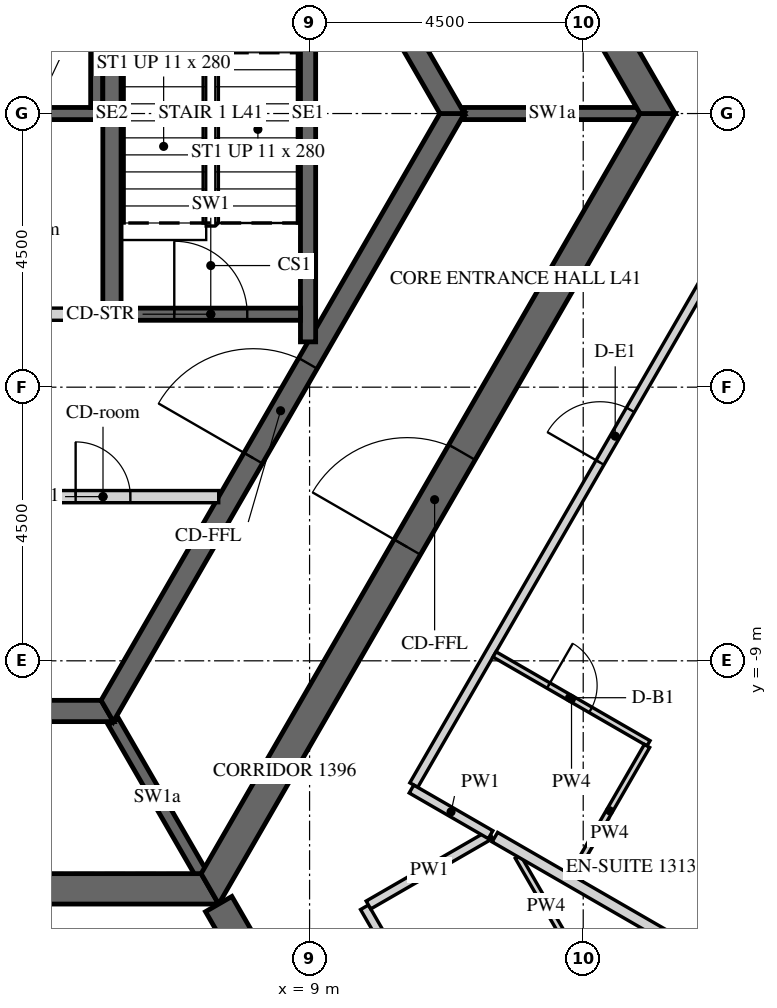
"""IFC4 building model, lengths in metres.
Left out: names, types, materials, properties, quantities, classifications, styles, units other than length and angle.
Written with IfcOpenShell. Run it as: python <this file> out.ifc"""

import sys

from ifc_helpers import new_model, si_unit, direction, frame, frame_2d, origin, place, context, subcontext, project, spatial, polyline, rectangle, outline, extrude, element, fill, save


model = new_model("IFC4")
c1 = context("Model", 3, precision=1e-05, world=origin(), true_north=direction((0.0, 1.0)))
c2 = subcontext(c1, "Body", "Model", "MODEL_VIEW")
j1 = project(units=[si_unit("LENGTHUNIT", "METRE"), si_unit("PLANEANGLEUNIT", "RADIAN")], contexts=[c1])
p1 = place(None, origin())
s1 = spatial("IfcSite", under=j1, at=p1, CompositionType="ELEMENT")
p2 = place(p1, origin())
s2 = spatial("IfcBuilding", under=s1, at=p2, CompositionType="ELEMENT")
p3 = place(p2, frame((0.0, 0.0, 176.1)))
s3 = spatial("IfcBuildingStorey", under=s2, at=p3, CompositionType="ELEMENT", Elevation=176.1)
p4 = place(p3, frame((-7.361, -12.75, -0.15), z_axis=(0.0, 0.0, 1.0), x_axis=(1.0, 0.0, 0.0)))
e1 = element("IfcWall", 1, at=p4, inside=s3, PredefinedType="SHEAR", context=c2, shape_type="SweptSolid", body=[
    extrude(outline(polyline([(-0.144, -0.25), (14.866, -0.25), (14.578, 0.25), (0.144, 0.25), (-0.144, -0.25)])), origin(), (0.0, 0.0, 1.0), 3.9),
])
p5 = place(p4, frame((6.761, 0.0, 0.15)))
e2 = element("IfcOpeningElement", 2, at=p5, cuts=e1, PredefinedType="OPENING", context=c2, shape_type="SweptSolid", body=[
    extrude(rectangle(XDim=1.2, YDim=2.4, at=frame_2d((0.6, 1.2))), frame((0.0, 0.26, 0.0), z_axis=(0.0, -1.0, 0.0), x_axis=(1.0, 0.0, 0.0)), (0.0, 0.0, 1.0), 0.52),
])
p6 = place(p3, frame((7.361, -12.75, -0.15), z_axis=(0.0, 0.0, 1.0), x_axis=(0.50000571537, 0.866022103989, 0.0)))
e3 = element("IfcWall", 3, at=p6, inside=s3, PredefinedType="SHEAR", context=c2, shape_type="SweptSolid", body=[
    extrude(outline(polyline([(-0.144, -0.25), (14.867, -0.25), (14.578, 0.25), (0.144, 0.25), (-0.144, -0.25)])), origin(), (0.0, 0.0, 1.0), 3.9),
])
p7 = place(p6, frame((6.49, 0.0, 0.15)))
e4 = element("IfcOpeningElement", 4, at=p7, cuts=e3, PredefinedType="OPENING", context=c2, shape_type="SweptSolid", body=[
    extrude(rectangle(XDim=1.8, YDim=2.4, at=frame_2d((0.9, 1.2))), frame((0.0, 0.26, 0.0), z_axis=(0.0, -1.0, 0.0), x_axis=(1.0, 0.0, 0.0)), (0.0, 0.0, 1.0), 0.52),
])
p8 = place(p3, frame((14.722, 0.0, -0.15), z_axis=(0.0, 0.0, 1.0), x_axis=(-0.50000571537, 0.866022103989, 0.0)))
e5 = element("IfcWall", 5, at=p8, inside=s3, PredefinedType="SHEAR", context=c2, shape_type="SweptSolid", body=[
    extrude(outline(polyline([(-0.144, -0.25), (14.867, -0.25), (14.578, 0.25), (0.144, 0.25), (-0.144, -0.25)])), origin(), (0.0, 0.0, 1.0), 3.9),
])
p9 = place(p8, frame((6.432, 0.0, 0.15)))
e6 = element("IfcOpeningElement", 6, at=p9, cuts=e5, PredefinedType="OPENING", context=c2, shape_type="SweptSolid", body=[
    extrude(rectangle(XDim=1.8, YDim=2.4, at=frame_2d((0.9, 1.2))), frame((0.0, 0.26, 0.0), z_axis=(0.0, -1.0, 0.0), x_axis=(1.0, 0.0, 0.0)), (0.0, 0.0, 1.0), 0.52),
])
p10 = place(p3, frame((7.506, -13.0, -0.15), z_axis=(0.0, 0.0, 1.0), x_axis=(0.499988271576, -0.866032175087, 0.0)))
e7 = element("IfcWall", 7, at=p10, inside=s3, PredefinedType="SHEAR", context=c2, shape_type="SweptSolid", body=[
    extrude(rectangle(XDim=15.424, YDim=0.5, at=frame_2d((7.712, 0.0))), origin(), (0.0, 0.0, 1.0), 3.9),
])
p11 = place(p10, frame((6.812, 0.0, 0.15)))
e8 = element("IfcOpeningElement", 8, at=p11, cuts=e7, PredefinedType="OPENING", context=c2, shape_type="SweptSolid", body=[
    extrude(rectangle(XDim=1.8, YDim=2.4, at=frame_2d((0.9, 1.2))), frame((0.0, 0.26, 0.0), z_axis=(0.0, -1.0, 0.0), x_axis=(1.0, 0.0, 0.0)), (0.0, 0.0, 1.0), 0.52),
])
p12 = place(p3, frame((-5.673, -9.825, -0.15), z_axis=(0.0, 0.0, 1.0), x_axis=(1.0, 0.0, 0.0)))
e9 = element("IfcWall", 9, at=p12, inside=s3, PredefinedType="SHEAR", context=c2, shape_type="SweptSolid", body=[
    extrude(outline(polyline([(-0.101, -0.175), (11.446, -0.175), (11.244, 0.175), (0.101, 0.175), (-0.101, -0.175)])), origin(), (0.0, 0.0, 1.0), 3.9),
])
p13 = place(p3, frame((5.673, -9.825, -0.15), z_axis=(0.0, 0.0, 1.0), x_axis=(0.499995046907, 0.866028263435, 0.0)))
e10 = element("IfcWall", 10, at=p13, inside=s3, PredefinedType="SHEAR", context=c2, shape_type="SweptSolid", body=[
    extrude(outline(polyline([(-0.101, -0.175), (11.446, -0.175), (11.244, 0.175), (0.101, 0.175), (-0.101, -0.175)])), origin(), (0.0, 0.0, 1.0), 3.9),
])
p14 = place(p13, frame((4.801, 0.0, 0.15)))
e11 = element("IfcOpeningElement", 11, at=p14, cuts=e10, PredefinedType="OPENING", context=c2, shape_type="SweptSolid", body=[
    extrude(rectangle(XDim=1.8, YDim=2.4, at=frame_2d((0.9, 1.2))), frame((0.0, 0.185, 0.0), z_axis=(0.0, -1.0, 0.0), x_axis=(1.0, 0.0, 0.0)), (0.0, 0.0, 1.0), 0.37),
])
p15 = place(p3, frame((11.345, 0.0, -0.15), z_axis=(0.0, 0.0, 1.0), x_axis=(-0.499995046907, 0.866028263435, 0.0)))
e12 = element("IfcWall", 12, at=p15, inside=s3, PredefinedType="SHEAR", context=c2, shape_type="SweptSolid", body=[
    extrude(outline(polyline([(-0.101, -0.175), (11.446, -0.175), (11.244, 0.175), (0.101, 0.175), (-0.101, -0.175)])), origin(), (0.0, 0.0, 1.0), 3.9),
])
p16 = place(p15, frame((4.744, 0.0, 0.15)))
e13 = element("IfcOpeningElement", 13, at=p16, cuts=e12, PredefinedType="OPENING", context=c2, shape_type="SweptSolid", body=[
    extrude(rectangle(XDim=1.8, YDim=2.4, at=frame_2d((0.9, 1.2))), frame((0.0, 0.185, 0.0), z_axis=(0.0, -1.0, 0.0), x_axis=(1.0, 0.0, 0.0)), (0.0, 0.0, 1.0), 0.37),
])
p17 = place(p3, frame((-5.6, 0.0, -0.25), z_axis=(0.0, 0.0, 1.0), x_axis=(1.0, 0.0, 0.0)))
e14 = element("IfcWall", 14, at=p17, inside=s3, PredefinedType="SHEAR", context=c2, shape_type="SweptSolid", body=[
    extrude(rectangle(XDim=11.2, YDim=0.2, at=frame_2d((5.6, 0.0))), origin(), (0.0, 0.0, 1.0), 3.9),
])
p18 = place(p3, frame((5.5, 0.1, -0.25), z_axis=(0.0, 0.0, 1.0), x_axis=(0.0, 1.0, 0.0)))
e15 = element("IfcWall", 15, at=p18, inside=s3, PredefinedType="SHEAR", context=c2, shape_type="SweptSolid", body=[
    extrude(rectangle(XDim=3.1, YDim=0.2, at=frame_2d((1.55, 0.0))), origin(), (0.0, 0.0, 1.0), 3.9),
])
p19 = place(p3, frame((2.75, -3.3, 0.0), z_axis=(0.0, 0.0, 1.0), x_axis=(1.0, 0.0, 0.0)))
e16 = element("IfcWall", 16, at=p19, inside=s3, PredefinedType="PARTITIONING", context=c2, shape_type="SweptSolid", body=[
    extrude(rectangle(XDim=2.85, YDim=0.2, at=frame_2d((1.425, 0.0))), origin(), (0.0, 0.0, 1.0), 3.65),
])
p20 = place(p19, frame((1.075, 0.0, 0.0)))
e17 = element("IfcOpeningElement", 17, at=p20, cuts=e16, PredefinedType="OPENING", context=c2, shape_type="SweptSolid", body=[
    extrude(rectangle(XDim=0.9, YDim=2.1, at=frame_2d((0.45, 1.05))), frame((0.0, 0.11, 0.0), z_axis=(0.0, -1.0, 0.0), x_axis=(1.0, 0.0, 0.0)), (0.0, 0.0, 1.0), 0.22),
])
p21 = place(p3, frame((3.7, -6.3, 0.0), z_axis=(0.0, 0.0, 1.0), x_axis=(1.0, 0.0, 0.0)))
e18 = element("IfcWall", 18, at=p21, inside=s3, PredefinedType="PARTITIONING", context=c2, shape_type="SweptSolid", body=[
    extrude(rectangle(XDim=3.806, YDim=0.2, at=frame_2d((1.903, 0.0))), origin(), (0.0, 0.0, 1.0), 3.65),
])
p22 = place(p21, frame((1.453, 0.0, 0.0)))
e19 = element("IfcOpeningElement", 19, at=p22, cuts=e18, PredefinedType="OPENING", context=c2, shape_type="SweptSolid", body=[
    extrude(rectangle(XDim=0.9, YDim=2.1, at=frame_2d((0.45, 1.05))), frame((0.0, 0.11, 0.0), z_axis=(0.0, -1.0, 0.0), x_axis=(1.0, 0.0, 0.0)), (0.0, 0.0, 1.0), 0.22),
])
for number, where, z_axis, x_axis in (
    (20, (11.547, 0.0, -0.15), (0.0, 0.0, 1.0), (1.0, 0.0, 0.0)),
    (21, (5.773, -10.0, -0.15), (0.0, 0.0, 1.0), (0.5, -0.866, 0.0)),
):
    element("IfcWall", number, at=place(p3, frame(where, z_axis=z_axis, x_axis=x_axis)), inside=s3, PredefinedType="SHEAR", context=c2, shape_type="SweptSolid", body=[
        extrude(rectangle(XDim=2.887, YDim=0.2, at=frame_2d((1.443, 0.0))), origin(), (0.0, 0.0, 1.0), 3.9),
    ])
p23 = place(p3, frame((5.75, -3.4, -0.25), z_axis=(0.0, 0.0, 1.0), x_axis=(0.0, 1.0, 0.0)))
e22 = element("IfcWall", 22, at=p23, inside=s3, PredefinedType="SHEAR", context=c2, shape_type="SweptSolid", body=[
    extrude(rectangle(XDim=6.8, YDim=0.3, at=frame_2d((3.4, 0.0))), origin(), (0.0, 0.0, 1.0), 3.9),
])
p24 = place(p3, frame((8.975, -3.755, -0.25), z_axis=(0.0, 0.0, 1.0), x_axis=(0.0, 1.0, 0.0)))
e23 = element("IfcWall", 23, at=p24, inside=s3, PredefinedType="SHEAR", context=c2, shape_type="SweptSolid", body=[
    extrude(rectangle(XDim=7.51, YDim=0.25, at=frame_2d((3.755, 0.0))), origin(), (0.0, 0.0, 1.0), 3.9),
])
p25 = place(p3, frame((5.9, -3.3, -0.25), z_axis=(0.0, 0.0, 1.0), x_axis=(1.0, 0.0, 0.0)))
e24 = element("IfcWall", 24, at=p25, inside=s3, PredefinedType="SHEAR", context=c2, shape_type="SweptSolid", body=[
    extrude(rectangle(XDim=2.95, YDim=0.2, at=frame_2d((1.475, 0.0))), origin(), (0.0, 0.0, 1.0), 3.9),
])
p26 = place(p25, frame((0.875, 0.0, 0.25)))
e25 = element("IfcOpeningElement", 25, at=p26, cuts=e24, PredefinedType="OPENING", context=c2, shape_type="SweptSolid", body=[
    extrude(rectangle(XDim=1.2, YDim=2.4, at=frame_2d((0.6, 1.2))), frame((0.0, 0.11, 0.0), z_axis=(0.0, -1.0, 0.0), x_axis=(1.0, 0.0, 0.0)), (0.0, 0.0, 1.0), 0.22),
])
p27 = place(p3, frame((13.699, -19.628, 0.0), z_axis=(0.0, 0.0, 1.0), x_axis=(-0.499998968938, 0.866025999068, 0.0)))
e26 = element("IfcWall", 26, at=p27, inside=s3, PredefinedType="PARTITIONING", context=c2, shape_type="SweptSolid", body=[
    extrude(rectangle(XDim=7.592, YDim=0.15, at=frame_2d((3.796, 0.0))), origin(), (0.0, 0.0, 1.0), 2.988),
])
p28 = place(p27, frame((2.233, 0.0, 0.0)))
e27 = element("IfcOpeningElement", 27, at=p28, cuts=e26, PredefinedType="OPENING", context=c2, shape_type="SweptSolid", body=[
    extrude(rectangle(XDim=1.0, YDim=2.1, at=frame_2d((0.5, 1.05))), frame((0.0, 0.085, 0.0), z_axis=(0.0, -1.0, 0.0), x_axis=(1.0, 0.0, 0.0)), (0.0, 0.0, 1.0), 0.17),
])
p29 = place(p3, frame((9.968, -13.016, 0.0), z_axis=(0.0, 0.0, 1.0), x_axis=(0.866022320763, 0.500005339912, 0.0)))
e28 = element("IfcWall", 28, at=p29, inside=s3, PredefinedType="PARTITIONING", context=c2, shape_type="SweptSolid", body=[
    extrude(rectangle(XDim=2.316, YDim=0.15, at=frame_2d((1.158, 0.0))), origin(), (0.0, 0.0, 1.0), 2.988),
])
p30 = place(p3, frame((10.714, -11.043, 0.0), z_axis=(0.0, 0.0, 1.0), x_axis=(0.500001980452, 0.866024260367, 0.0)))
e29 = element("IfcWall", 29, at=p30, inside=s3, PredefinedType="PARTITIONING", context=c2, shape_type="SweptSolid", body=[
    extrude(rectangle(XDim=12.752, YDim=0.15, at=frame_2d((6.376, 0.0))), origin(), (0.0, 0.0, 1.0), 2.988),
])
p31 = place(p30, frame((6.125, 0.0, 0.0)))
e30 = element("IfcOpeningElement", 30, at=p31, cuts=e29, PredefinedType="OPENING", context=c2, shape_type="SweptSolid", body=[
    extrude(rectangle(XDim=1.0, YDim=2.1, at=frame_2d((0.5, 1.05))), frame((0.0, 0.085, 0.0), z_axis=(0.0, -1.0, 0.0), x_axis=(1.0, 0.0, 0.0)), (0.0, 0.0, 1.0), 0.17),
])
p32 = place(p30, frame((11.602, 0.0, 0.0)))
e31 = element("IfcOpeningElement", 31, at=p32, cuts=e29, PredefinedType="OPENING", context=c2, shape_type="SweptSolid", body=[
    extrude(rectangle(XDim=1.0, YDim=2.1, at=frame_2d((0.5, 1.05))), frame((0.0, 0.085, 0.0), z_axis=(0.0, -1.0, 0.0), x_axis=(1.0, 0.0, 0.0)), (0.0, 0.0, 1.0), 0.17),
])
p33 = place(p3, frame((11.977, -11.859, 0.0), z_axis=(0.0, 0.0, 1.0), x_axis=(-0.865993364801, 0.500055489042, 0.0)))
e32 = element("IfcWall", 32, at=p33, inside=s3, PredefinedType="PARTITIONING", context=c2, shape_type="SweptSolid", body=[
    extrude(rectangle(XDim=1.502, YDim=0.15, at=frame_2d((0.751, 0.0))), origin(), (0.0, 0.0, 1.0), 2.988),
])
p34 = place(p3, frame((17.046, 0.075, 0.0), z_axis=(0.0, 0.0, 1.0), x_axis=(-0.499999403554, 0.866025748143, 0.0)))
e33 = element("IfcWall", 33, at=p34, inside=s3, PredefinedType="PARTITIONING", context=c2, shape_type="SweptSolid", body=[
    extrude(rectangle(XDim=14.549, YDim=0.15, at=frame_2d((7.275, 0.0))), origin(), (0.0, 0.0, 1.0), 2.988),
])
p35 = place(p34, frame((6.901, 0.0, 0.0)))
e34 = element("IfcOpeningElement", 34, at=p35, cuts=e33, PredefinedType="OPENING", context=c2, shape_type="SweptSolid", body=[
    extrude(rectangle(XDim=1.0, YDim=2.1, at=frame_2d((0.5, 1.05))), frame((0.0, 0.085, 0.0), z_axis=(0.0, -1.0, 0.0), x_axis=(1.0, 0.0, 0.0)), (0.0, 0.0, 1.0), 0.17),
])
p36 = place(p3, frame((12.426, -12.223, 0.0), z_axis=(0.0, 0.0, 1.0), x_axis=(0.499927229454, -0.866067413802, 0.0)))
e35 = element("IfcWall", 35, at=p36, inside=s3, PredefinedType="PARTITIONING", context=c2, shape_type="SweptSolid", body=[
    extrude(rectangle(XDim=1.858, YDim=0.1, at=frame_2d((0.929, 0.0))), origin(), (0.0, 0.0, 1.0), 2.988),
])
p37 = place(p3, frame((21.631, -17.433, 0.0), z_axis=(0.0, 0.0, 1.0), x_axis=(-0.866031296205, 0.499989793889, 0.0)))
e36 = element("IfcWall", 36, at=p37, inside=s3, PredefinedType="PARTITIONING", context=c2, shape_type="SweptSolid", body=[
    extrude(rectangle(XDim=11.067, YDim=0.18, at=frame_2d((5.534, 0.0))), origin(), (0.0, 0.0, 1.0), 2.988),
])
p38 = place(p3, frame((12.041, -8.894, 0.0), z_axis=(0.0, 0.0, 1.0), x_axis=(0.866046596414, -0.499963291492, 0.0)))
e37 = element("IfcWall", 37, at=p38, inside=s3, PredefinedType="PARTITIONING", context=c2, shape_type="SweptSolid", body=[
    extrude(rectangle(XDim=2.925, YDim=0.1, at=frame_2d((1.462, 0.0))), origin(), (0.0, 0.0, 1.0), 2.988),
])
p39 = place(p38, frame((1.025, 0.0, 0.0)))
e38 = element("IfcOpeningElement", 38, at=p39, cuts=e37, PredefinedType="OPENING", context=c2, shape_type="SweptSolid", body=[
    extrude(rectangle(XDim=0.8, YDim=2.1, at=frame_2d((0.4, 1.05))), frame((0.0, 0.06, 0.0), z_axis=(0.0, -1.0, 0.0), x_axis=(1.0, 0.0, 0.0)), (0.0, 0.0, 1.0), 0.12),
])
p40 = place(p3, frame((14.549, -10.4, 0.0), z_axis=(0.0, 0.0, 1.0), x_axis=(-0.500003092839, -0.866023618125, 0.0)))
e39 = element("IfcWall", 39, at=p40, inside=s3, PredefinedType="PARTITIONING", context=c2, shape_type="SweptSolid", body=[
    extrude(rectangle(XDim=2.46, YDim=0.1, at=frame_2d((1.23, 0.0))), origin(), (0.0, 0.0, 1.0), 2.988),
])
p41 = place(p7, origin())
e40 = element("IfcDoor", 40, at=p41, inside=s3, OperationType="DOUBLE_DOOR_SINGLE_SWING", PredefinedType="DOOR", context=c2, shape_type="SweptSolid", body=[
    extrude(rectangle(XDim=1.8, YDim=2.4, at=frame_2d((0.9, 1.2))), frame((0.0, 0.025, 0.0), z_axis=(0.0, -1.0, 0.0), x_axis=(1.0, 0.0, 0.0)), (0.0, 0.0, 1.0), 0.05),
])
fill(e4, e40)
p42 = place(p14, origin())
e41 = element("IfcDoor", 41, at=p42, inside=s3, OperationType="DOUBLE_DOOR_SINGLE_SWING", PredefinedType="DOOR", context=c2, shape_type="SweptSolid", body=[
    extrude(rectangle(XDim=1.8, YDim=2.4, at=frame_2d((0.9, 1.2))), frame((0.0, 0.025, 0.0), z_axis=(0.0, -1.0, 0.0), x_axis=(1.0, 0.0, 0.0)), (0.0, 0.0, 1.0), 0.05),
])
fill(e11, e41)
p43 = place(p22, origin())
e42 = element("IfcDoor", 42, at=p43, inside=s3, OperationType="SINGLE_SWING_LEFT", PredefinedType="DOOR", context=c2, shape_type="SweptSolid", body=[
    extrude(rectangle(XDim=0.9, YDim=2.1, at=frame_2d((0.45, 1.05))), frame((0.0, 0.025, 0.0), z_axis=(0.0, -1.0, 0.0), x_axis=(1.0, 0.0, 0.0)), (0.0, 0.0, 1.0), 0.05),
])
fill(e19, e42)
p44 = place(p26, origin())
e43 = element("IfcDoor", 43, at=p44, inside=s3, OperationType="SINGLE_SWING_LEFT", PredefinedType="DOOR", context=c2, shape_type="SweptSolid", body=[
    extrude(rectangle(XDim=1.2, YDim=2.4, at=frame_2d((0.6, 1.2))), frame((0.0, 0.025, 0.0), z_axis=(0.0, -1.0, 0.0), x_axis=(1.0, 0.0, 0.0)), (0.0, 0.0, 1.0), 0.05),
])
fill(e25, e43)
p45 = place(p31, origin())
e44 = element("IfcDoor", 44, at=p45, inside=s3, OperationType="SINGLE_SWING_LEFT", PredefinedType="DOOR", context=c2, shape_type="SweptSolid", body=[
    extrude(rectangle(XDim=1.0, YDim=2.1, at=frame_2d((0.5, 1.05))), frame((0.0, 0.025, 0.0), z_axis=(0.0, -1.0, 0.0), x_axis=(1.0, 0.0, 0.0)), (0.0, 0.0, 1.0), 0.05),
])
fill(e30, e44)
p46 = place(p39, origin())
e45 = element("IfcDoor", 45, at=p46, inside=s3, OperationType="SINGLE_SWING_RIGHT", PredefinedType="DOOR", context=c2, shape_type="SweptSolid", body=[
    extrude(rectangle(XDim=0.8, YDim=2.1, at=frame_2d((0.4, 1.05))), frame((0.0, 0.025, 0.0), z_axis=(0.0, -1.0, 0.0), x_axis=(1.0, 0.0, 0.0)), (0.0, 0.0, 1.0), 0.05),
])
fill(e38, e45)
save(model, sys.argv[1])
